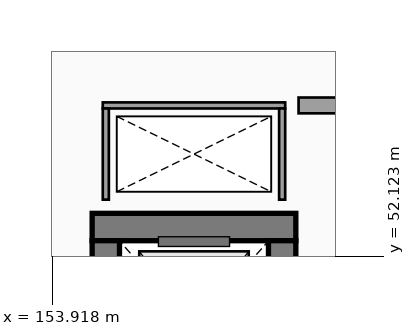
"""IFC4 building model, lengths in metres.
Left out: names, types, materials, properties, quantities, classifications, styles, units other than length and angle.
Written with IfcOpenShell. Run it as: python <this file> out.ifc"""

import sys

from ifc_helpers import new_model, si_unit, direction, frame, frame_2d, origin, place, context, subcontext, project, spatial, rectangle, extrude, element, save


model = new_model("IFC4")
c1 = context("Model", 3, precision=1e-05, world=origin(), true_north=direction((0.0, 1.0)))
c2 = subcontext(c1, "Body", "Model", "MODEL_VIEW")
j1 = project(units=[si_unit("LENGTHUNIT", "METRE"), si_unit("PLANEANGLEUNIT", "RADIAN")], contexts=[c1])
p1 = place(None, origin())
s1 = spatial("IfcSite", under=j1, at=p1, CompositionType="ELEMENT")
p2 = place(p1, origin())
s2 = spatial("IfcBuilding", under=s1, at=p2, CompositionType="ELEMENT")
p3 = place(p2, frame((0.0, 0.0, 14.1)))
s3 = spatial("IfcBuildingStorey", under=s2, at=p3, CompositionType="ELEMENT", Elevation=14.1)
p4 = place(p3, frame((157.925, 52.6, 0.0), z_axis=(0.0, 0.0, 1.0), x_axis=(-1.0, 0.0, 0.0)))
e1 = element("IfcWall", 1, at=p4, inside=s3, PredefinedType="SHEAR", context=c2, shape_type="SweptSolid", body=[
    extrude(rectangle(XDim=3.35, YDim=0.45, at=frame_2d((1.675, 0.0))), origin(), (0.0, 0.0, 1.0), 4.24),
])
p5 = place(p3, frame((154.8, 52.375, 0.0), z_axis=(0.0, 0.0, 1.0), x_axis=(0.0, -1.0, 0.0)))
e2 = element("IfcWall", 2, at=p5, inside=s3, PredefinedType="SHEAR", context=c2, shape_type="SweptSolid", body=[
    extrude(rectangle(XDim=2.75, YDim=0.45, at=frame_2d((1.375, 0.0))), origin(), (0.0, 0.0, 1.0), 4.24),
])
p6 = place(p3, frame((157.7, 49.625, 0.0), z_axis=(0.0, 0.0, 1.0), x_axis=(0.0, 1.0, 0.0)))
e3 = element("IfcWall", 3, at=p6, inside=s3, PredefinedType="SHEAR", context=c2, shape_type="SweptSolid", body=[
    extrude(rectangle(XDim=2.75, YDim=0.45, at=frame_2d((1.375, 0.0))), origin(), (0.0, 0.0, 1.0), 4.24),
])
p7 = place(p6, frame((0.725, 0.0, 0.0), z_axis=(0.0, 0.0, 1.0), x_axis=(1.0, 0.0, 0.0)))
e4 = element("IfcOpeningElement", 4, at=p7, cuts=e3, PredefinedType="OPENING", context=c2, shape_type="SweptSolid", body=[
    extrude(rectangle(XDim=1.3, YDim=2.25, at=frame_2d((0.65, 1.125))), frame((0.0, 0.235, 0.0), z_axis=(0.0, -1.0, 0.0), x_axis=(1.0, 0.0, 0.0)), (0.0, 0.0, 1.0), 0.47),
])
p8 = place(p3, frame((157.75, 54.6, 0.0), z_axis=(0.0, 0.0, 1.0), x_axis=(-1.0, 0.0, 0.0)))
e5 = element("IfcWall", 5, at=p8, inside=s3, PredefinedType="PARTITIONING", context=c2, shape_type="SweptSolid", body=[
    extrude(rectangle(XDim=3.0, YDim=0.1, at=frame_2d((1.5, 0.0))), origin(), (0.0, 0.0, 1.0), 4.24),
])
for number, where, z_axis, x_axis in (
    (6, (154.8, 54.55, 0.0), (0.0, 0.0, 1.0), (0.0, -1.0, 0.0)),
    (7, (157.7, 53.05, 0.0), (0.0, 0.0, 1.0), (0.0, 1.0, 0.0)),
):
    element("IfcWall", number, at=place(p3, frame(where, z_axis=z_axis, x_axis=x_axis)), inside=s3, PredefinedType="PARTITIONING", context=c2, shape_type="SweptSolid", body=[
        extrude(rectangle(XDim=1.5, YDim=0.1, at=frame_2d((0.75, 0.0))), origin(), (0.0, 0.0, 1.0), 4.24),
    ])
p9 = place(p3, frame((161.73, 54.6, 0.0), z_axis=(0.0, 0.0, 1.0), x_axis=(-1.0, 0.0, 0.0)))
e8 = element("IfcWall", 8, at=p9, inside=s3, PredefinedType="SOLIDWALL", context=c2, shape_type="SweptSolid", body=[
    extrude(rectangle(XDim=3.76, YDim=0.26, at=frame_2d((1.88, 0.0))), origin(), (0.0, 0.0, 1.0), 4.24),
])
p10 = place(p9, frame((2.805, 0.0, 0.0), z_axis=(0.0, 0.0, 1.0), x_axis=(-1.0, 0.0, 0.0)))
e9 = element("IfcOpeningElement", 9, at=p10, cuts=e8, PredefinedType="OPENING", context=c2, shape_type="SweptSolid", body=[
    extrude(rectangle(XDim=1.85, YDim=2.25, at=frame_2d((0.925, 1.125))), frame((0.0, 0.14, 0.0), z_axis=(0.0, -1.0, 0.0), x_axis=(1.0, 0.0, 0.0)), (0.0, 0.0, 1.0), 0.28),
])
save(model, sys.argv[1])
